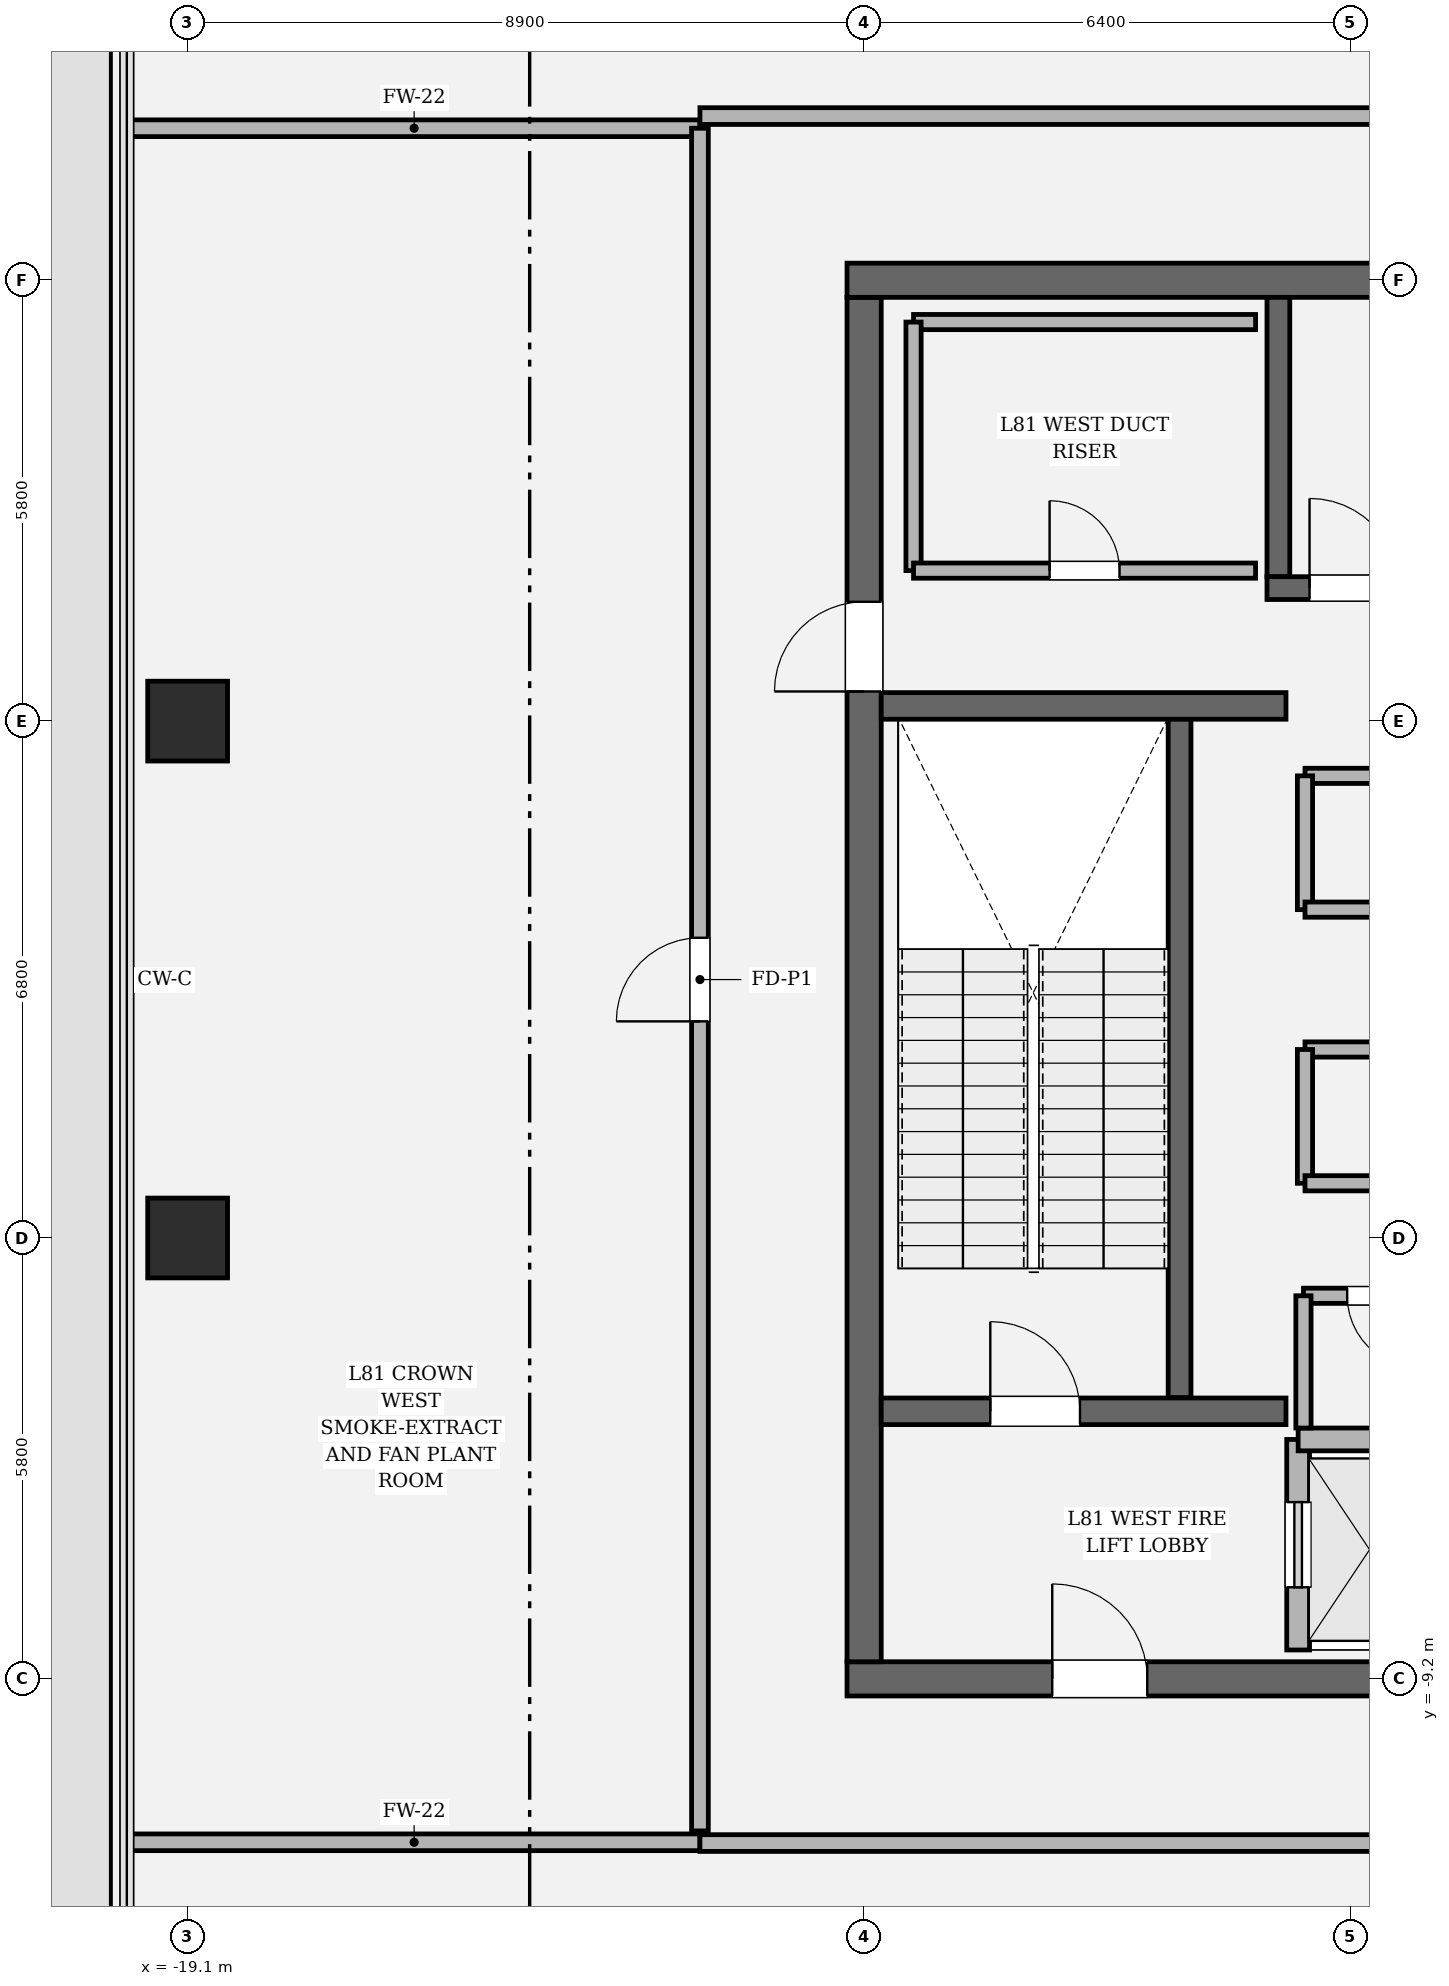
"""IFC4 building model, lengths in metres.
Left out: names, types, materials, properties, quantities, classifications, styles, units other than length and angle.
Written with IfcOpenShell. Run it as: python <this file> out.ifc"""

import sys

from ifc_helpers import new_model, si_unit, direction, frame, frame_2d, origin, origin_2d, place, context, subcontext, project, spatial, rectangle, hollow_rectangle, extrude, element, fill, save


model = new_model("IFC4")
c1 = context("Model", 3, precision=1e-05, world=origin(), true_north=direction((0.0, 1.0)))
c2 = subcontext(c1, "Body", "Model", "MODEL_VIEW")
j1 = project(units=[si_unit("LENGTHUNIT", "METRE"), si_unit("PLANEANGLEUNIT", "RADIAN")], contexts=[c1])
p1 = place(None, origin())
s1 = spatial("IfcSite", under=j1, at=p1, CompositionType="ELEMENT")
p2 = place(p1, origin())
s2 = spatial("IfcBuilding", under=s1, at=p2, CompositionType="ELEMENT")
p3 = place(p2, frame((0.0, 0.0, 343.8)))
s3 = spatial("IfcBuildingStorey", under=s2, at=p3, CompositionType="ELEMENT", Elevation=343.8)
p4 = place(p3, frame((10.425, -9.2, 0.0), z_axis=(0.0, 0.0, 1.0), x_axis=(-1.0, 0.0, 0.0)))
e1 = element("IfcWall", 1, at=p4, inside=s3, PredefinedType="SHEAR", context=c2, shape_type="SweptSolid", body=[
    extrude(rectangle(XDim=20.85, YDim=0.45, at=frame_2d((10.425, 0.0))), origin(), (0.0, 0.0, 1.0), 4.5),
])
p5 = place(p4, frame((2.7, 0.0, 0.0)))
e2 = element("IfcOpeningElement", 2, at=p5, cuts=e1, PredefinedType="OPENING", context=c2, shape_type="SweptSolid", body=[
    extrude(rectangle(XDim=1.25, YDim=2.25, at=frame_2d((0.625, 1.125))), frame((0.0, 0.235, 0.0), z_axis=(0.0, -1.0, 0.0), x_axis=(1.0, 0.0, 0.0)), (0.0, 0.0, 1.0), 0.47),
])
p6 = place(p4, frame((16.9, 0.0, 0.0)))
e3 = element("IfcOpeningElement", 3, at=p6, cuts=e1, PredefinedType="OPENING", context=c2, shape_type="SweptSolid", body=[
    extrude(rectangle(XDim=1.25, YDim=2.25, at=frame_2d((0.625, 1.125))), frame((0.0, 0.235, 0.0), z_axis=(0.0, -1.0, 0.0), x_axis=(1.0, 0.0, 0.0)), (0.0, 0.0, 1.0), 0.47),
])
p7 = place(p3, frame((-10.2, -8.975, 0.0), z_axis=(0.0, 0.0, 1.0), x_axis=(0.0, 1.0, 0.0)))
e4 = element("IfcWall", 4, at=p7, inside=s3, PredefinedType="SHEAR", context=c2, shape_type="SweptSolid", body=[
    extrude(rectangle(XDim=17.95, YDim=0.45, at=frame_2d((8.975, 0.0))), origin(), (0.0, 0.0, 1.0), 4.5),
])
p8 = place(p7, frame((12.765, 0.0, 0.0)))
e5 = element("IfcOpeningElement", 5, at=p8, cuts=e4, PredefinedType="OPENING", context=c2, shape_type="SweptSolid", body=[
    extrude(rectangle(XDim=1.18, YDim=2.2, at=frame_2d((0.59, 1.1))), frame((0.0, 0.235, 0.0), z_axis=(0.0, -1.0, 0.0), x_axis=(1.0, 0.0, 0.0)), (0.0, 0.0, 1.0), 0.47),
])
p9 = place(p3, frame((-10.425, 9.2, 0.0), z_axis=(0.0, 0.0, 1.0), x_axis=(1.0, 0.0, 0.0)))
e6 = element("IfcWall", 6, at=p9, inside=s3, PredefinedType="SHEAR", context=c2, shape_type="SweptSolid", body=[
    extrude(rectangle(XDim=20.85, YDim=0.45, at=frame_2d((10.425, 0.0))), origin(), (0.0, 0.0, 1.0), 4.5),
])
p10 = place(p3, frame((-6.05, -5.5, 0.0), z_axis=(0.0, 0.0, 1.0), x_axis=(0.0, 1.0, 0.0)))
e7 = element("IfcWall", 7, at=p10, inside=s3, PredefinedType="SOLIDWALL", context=c2, shape_type="SweptSolid", body=[
    extrude(rectangle(XDim=8.95, YDim=0.3, at=frame_2d((4.475, 0.0))), origin(), (0.0, 0.0, 1.0), 4.5),
])
p11 = place(p3, frame((-4.75, 5.3, 0.0), z_axis=(0.0, 0.0, 1.0), x_axis=(0.0, 1.0, 0.0)))
e8 = element("IfcWall", 8, at=p11, inside=s3, PredefinedType="SOLIDWALL", context=c2, shape_type="SweptSolid", body=[
    extrude(rectangle(XDim=3.675, YDim=0.3, at=frame_2d((1.837, 0.0))), origin(), (0.0, 0.0, 1.0), 4.5),
])
p12 = place(p3, frame((-4.9, 5.15, 0.0), z_axis=(0.0, 0.0, 1.0), x_axis=(1.0, 0.0, 0.0)))
e9 = element("IfcWall", 9, at=p12, inside=s3, PredefinedType="SOLIDWALL", context=c2, shape_type="SweptSolid", body=[
    extrude(rectangle(XDim=9.8, YDim=0.3, at=frame_2d((4.9, 0.0))), origin(), (0.0, 0.0, 1.0), 4.5),
])
p13 = place(p12, frame((0.56, 0.0, 0.0)))
e10 = element("IfcOpeningElement", 10, at=p13, cuts=e9, PredefinedType="OPENING", context=c2, shape_type="SweptSolid", body=[
    extrude(rectangle(XDim=1.18, YDim=2.2, at=frame_2d((0.59, 1.1))), frame((0.0, 0.16, 0.0), z_axis=(0.0, -1.0, 0.0), x_axis=(1.0, 0.0, 0.0)), (0.0, 0.0, 1.0), 0.32),
])
p14 = place(p3, frame((-9.975, -5.68, 0.0), z_axis=(0.0, 0.0, 1.0), x_axis=(1.0, 0.0, 0.0)))
e11 = element("IfcWall", 11, at=p14, inside=s3, PredefinedType="SOLIDWALL", context=c2, shape_type="SweptSolid", body=[
    extrude(rectangle(XDim=5.325, YDim=0.35, at=frame_2d((2.663, 0.0))), origin(), (0.0, 0.0, 1.0), 4.5),
])
p15 = place(p14, frame((1.435, 0.0, 0.0)))
e12 = element("IfcOpeningElement", 12, at=p15, cuts=e11, PredefinedType="OPENING", context=c2, shape_type="SweptSolid", body=[
    extrude(rectangle(XDim=1.18, YDim=2.2, at=frame_2d((0.59, 1.1))), frame((0.0, 0.185, 0.0), z_axis=(0.0, -1.0, 0.0), x_axis=(1.0, 0.0, 0.0)), (0.0, 0.0, 1.0), 0.37),
])
p16 = place(p3, frame((-9.975, 3.6, 0.0), z_axis=(0.0, 0.0, 1.0), x_axis=(1.0, 0.0, 0.0)))
e13 = element("IfcWall", 13, at=p16, inside=s3, PredefinedType="SOLIDWALL", context=c2, shape_type="SweptSolid", body=[
    extrude(rectangle(XDim=5.325, YDim=0.35, at=frame_2d((2.663, 0.0))), origin(), (0.0, 0.0, 1.0), 4.5),
])
for number, where, z_axis, x_axis in (
    (14, (-19.1, 3.4, 0.0), (0.0, 0.0, 1.0), (1.0, 0.0, 0.0)),
    (15, (-19.1, -3.4, 0.0), (0.0, 0.0, 1.0), (1.0, 0.0, 0.0)),
):
    element("IfcColumn", number, at=place(p3, frame(where, z_axis=z_axis, x_axis=x_axis)), inside=s3, PredefinedType="COLUMN", context=c2, shape_type="SweptSolid", body=[
        extrude(hollow_rectangle(XDim=1.05, YDim=1.05, WallThickness=0.03, at=origin_2d()), origin(), (0.0, 0.0, 1.0), 4.5),
    ])
p17 = place(p3, frame((-4.49, -8.82, 0.0), z_axis=(0.0, 0.0, 1.0), x_axis=(0.0, 1.0, 0.0)))
e16 = element("IfcWall", 16, at=p17, inside=s3, PredefinedType="SOLIDWALL", context=c2, shape_type="SweptSolid", body=[
    extrude(rectangle(XDim=2.77, YDim=0.3, at=frame_2d((1.385, 0.0))), origin(), (0.0, 0.0, 1.0), 4.28),
])
p18 = place(p17, frame((0.825, 0.0, 0.0)))
e17 = element("IfcOpeningElement", 17, at=p18, cuts=e16, PredefinedType="OPENING", context=c2, shape_type="SweptSolid", body=[
    extrude(rectangle(XDim=1.12, YDim=2.25, at=frame_2d((0.56, 1.125))), frame((0.0, 0.16, 0.0), z_axis=(0.0, -1.0, 0.0), x_axis=(1.0, 0.0, 0.0)), (0.0, 0.0, 1.0), 0.32),
])
p19 = place(p3, frame((-4.49, -6.05, 0.0), z_axis=(0.0, 0.0, 1.0), x_axis=(1.0, 0.0, 0.0)))
e18 = element("IfcWall", 18, at=p19, inside=s3, PredefinedType="SOLIDWALL", context=c2, shape_type="SweptSolid", body=[
    extrude(rectangle(XDim=1.88, YDim=0.3, at=frame_2d((0.94, 0.0))), origin(), (0.0, 0.0, 1.0), 4.28),
])
p20 = place(p3, frame((-2.32, -4.16, 0.0), z_axis=(0.0, 0.0, 1.0), x_axis=(-1.0, 0.0, 0.0)))
e19 = element("IfcWall", 19, at=p20, inside=s3, PredefinedType="SOLIDWALL", context=c2, shape_type="SweptSolid", body=[
    extrude(rectangle(XDim=2.1, YDim=0.2, at=frame_2d((1.05, 0.0))), origin(), (0.0, 0.0, 1.0), 4.28),
])
p21 = place(p20, frame((0.575, 0.0, 0.0)))
e20 = element("IfcOpeningElement", 20, at=p21, cuts=e19, PredefinedType="OPENING", context=c2, shape_type="SweptSolid", body=[
    extrude(rectangle(XDim=0.95, YDim=2.15, at=frame_2d((0.475, 1.075))), frame((0.0, 0.11, 0.0), z_axis=(0.0, -1.0, 0.0), x_axis=(1.0, 0.0, 0.0)), (0.0, 0.0, 1.0), 0.22),
])
p22 = place(p3, frame((-4.42, -4.16, 0.0), z_axis=(0.0, 0.0, 1.0), x_axis=(0.0, -1.0, 0.0)))
e21 = element("IfcWall", 21, at=p22, inside=s3, PredefinedType="SOLIDWALL", context=c2, shape_type="SweptSolid", body=[
    extrude(rectangle(XDim=1.74, YDim=0.2, at=frame_2d((0.87, 0.0))), origin(), (0.0, 0.0, 1.0), 4.28),
])
p23 = place(p3, frame((4.4, -0.92, 0.0), z_axis=(0.0, 0.0, 1.0), x_axis=(-1.0, 0.0, 0.0)))
e22 = element("IfcWall", 22, at=p23, inside=s3, PredefinedType="SOLIDWALL", context=c2, shape_type="SweptSolid", body=[
    extrude(rectangle(XDim=8.8, YDim=0.2, at=frame_2d((4.4, 0.0))), origin(), (0.0, 0.0, 1.0), 4.28),
])
p24 = place(p3, frame((-4.4, -0.92, 0.0), z_axis=(0.0, 0.0, 1.0), x_axis=(0.0, -1.0, 0.0)))
e23 = element("IfcWall", 23, at=p24, inside=s3, PredefinedType="SOLIDWALL", context=c2, shape_type="SweptSolid", body=[
    extrude(rectangle(XDim=1.76, YDim=0.2, at=frame_2d((0.88, 0.0))), origin(), (0.0, 0.0, 1.0), 4.28),
])
for number, where, z_axis, x_axis in (
    (24, (-4.4, -2.68, 0.0), (0.0, 0.0, 1.0), (1.0, 0.0, 0.0)),
    (25, (4.4, 2.68, 0.0), (0.0, 0.0, 1.0), (-1.0, 0.0, 0.0)),
):
    element("IfcWall", number, at=place(p3, frame(where, z_axis=z_axis, x_axis=x_axis)), inside=s3, PredefinedType="SOLIDWALL", context=c2, shape_type="SweptSolid", body=[
        extrude(rectangle(XDim=8.8, YDim=0.2, at=frame_2d((4.4, 0.0))), origin(), (0.0, 0.0, 1.0), 4.28),
    ])
p25 = place(p3, frame((-4.4, 2.68, 0.0), z_axis=(0.0, 0.0, 1.0), x_axis=(0.0, -1.0, 0.0)))
e26 = element("IfcWall", 26, at=p25, inside=s3, PredefinedType="SOLIDWALL", context=c2, shape_type="SweptSolid", body=[
    extrude(rectangle(XDim=1.76, YDim=0.2, at=frame_2d((0.88, 0.0))), origin(), (0.0, 0.0, 1.0), 4.28),
])
p26 = place(p3, frame((-4.4, 0.92, 0.0), z_axis=(0.0, 0.0, 1.0), x_axis=(1.0, 0.0, 0.0)))
e27 = element("IfcWall", 27, at=p26, inside=s3, PredefinedType="SOLIDWALL", context=c2, shape_type="SweptSolid", body=[
    extrude(rectangle(XDim=8.8, YDim=0.2, at=frame_2d((4.4, 0.0))), origin(), (0.0, 0.0, 1.0), 4.28),
])
p27 = place(p3, frame((-5.05, 8.65, 0.0), z_axis=(0.0, 0.0, 1.0), x_axis=(-1.0, 0.0, 0.0)))
e28 = element("IfcWall", 28, at=p27, inside=s3, PredefinedType="SOLIDWALL", context=c2, shape_type="SweptSolid", body=[
    extrude(rectangle(XDim=4.5, YDim=0.2, at=frame_2d((2.25, 0.0))), origin(), (0.0, 0.0, 1.0), 4.28),
])
p28 = place(p3, frame((-9.55, 8.65, 0.0), z_axis=(0.0, 0.0, 1.0), x_axis=(0.0, -1.0, 0.0)))
e29 = element("IfcWall", 29, at=p28, inside=s3, PredefinedType="SOLIDWALL", context=c2, shape_type="SweptSolid", body=[
    extrude(rectangle(XDim=3.27, YDim=0.2, at=frame_2d((1.635, 0.0))), origin(), (0.0, 0.0, 1.0), 4.28),
])
p29 = place(p3, frame((-9.55, 5.38, 0.0), z_axis=(0.0, 0.0, 1.0), x_axis=(1.0, 0.0, 0.0)))
e30 = element("IfcWall", 30, at=p29, inside=s3, PredefinedType="SOLIDWALL", context=c2, shape_type="SweptSolid", body=[
    extrude(rectangle(XDim=4.5, YDim=0.2, at=frame_2d((2.25, 0.0))), origin(), (0.0, 0.0, 1.0), 4.28),
])
p30 = place(p29, frame((1.79, 0.0, 0.0)))
e31 = element("IfcOpeningElement", 31, at=p30, cuts=e30, PredefinedType="OPENING", context=c2, shape_type="SweptSolid", body=[
    extrude(rectangle(XDim=0.92, YDim=2.1, at=frame_2d((0.46, 1.05))), frame((0.0, 0.11, 0.0), z_axis=(0.0, -1.0, 0.0), x_axis=(1.0, 0.0, 0.0)), (0.0, 0.0, 1.0), 0.22),
])
p31 = place(p3, frame((-19.88, -11.35, 0.0), z_axis=(0.0, 0.0, 1.0), x_axis=(1.0, 0.0, 0.0)))
e32 = element("IfcWall", 32, at=p31, inside=s3, PredefinedType="SOLIDWALL", context=c2, shape_type="SweptSolid", body=[
    extrude(rectangle(XDim=7.52, YDim=0.22, at=frame_2d((3.76, 0.0))), origin(), (0.0, 0.0, 1.0), 2.954),
])
p32 = place(p3, frame((-12.36, -11.36, 0.0), z_axis=(0.0, 0.0, 1.0), x_axis=(1.0, 0.0, 0.0)))
e33 = element("IfcWall", 33, at=p32, inside=s3, PredefinedType="SOLIDWALL", context=c2, shape_type="SweptSolid", body=[
    extrude(rectangle(XDim=24.72, YDim=0.22, at=frame_2d((12.36, 0.0))), origin(), (0.0, 0.0, 1.0), 2.954),
])
p33 = place(p32, frame((11.81, 0.0, 0.0)))
e34 = element("IfcOpeningElement", 34, at=p33, cuts=e33, PredefinedType="OPENING", context=c2, shape_type="SweptSolid", body=[
    extrude(rectangle(XDim=1.1, YDim=2.2, at=frame_2d((0.55, 1.1))), frame((0.0, 0.12, 0.0), z_axis=(0.0, -1.0, 0.0), x_axis=(1.0, 0.0, 0.0)), (0.0, 0.0, 1.0), 0.24),
])
p34 = place(p3, frame((-19.88, 11.2, 0.0), z_axis=(0.0, 0.0, 1.0), x_axis=(1.0, 0.0, 0.0)))
e35 = element("IfcWall", 35, at=p34, inside=s3, PredefinedType="SOLIDWALL", context=c2, shape_type="SweptSolid", body=[
    extrude(rectangle(XDim=7.52, YDim=0.22, at=frame_2d((3.76, 0.0))), origin(), (0.0, 0.0, 1.0), 2.954),
])
p35 = place(p3, frame((-12.36, 11.2, 0.0), z_axis=(0.0, 0.0, 1.0), x_axis=(0.0, -1.0, 0.0)))
e36 = element("IfcWall", 36, at=p35, inside=s3, PredefinedType="SOLIDWALL", context=c2, shape_type="SweptSolid", body=[
    extrude(rectangle(XDim=22.4, YDim=0.22, at=frame_2d((11.2, 0.0))), origin(), (0.0, 0.0, 1.0), 2.954),
])
p36 = place(p35, frame((10.65, 0.0, 0.0)))
e37 = element("IfcOpeningElement", 37, at=p36, cuts=e36, PredefinedType="OPENING", context=c2, shape_type="SweptSolid", body=[
    extrude(rectangle(XDim=1.1, YDim=2.2, at=frame_2d((0.55, 1.1))), frame((0.0, 0.12, 0.0), z_axis=(0.0, -1.0, 0.0), x_axis=(1.0, 0.0, 0.0)), (0.0, 0.0, 1.0), 0.24),
])
p37 = place(p3, frame((12.36, 11.36, 0.0), z_axis=(0.0, 0.0, 1.0), x_axis=(-1.0, 0.0, 0.0)))
e38 = element("IfcWall", 38, at=p37, inside=s3, PredefinedType="SOLIDWALL", context=c2, shape_type="SweptSolid", body=[
    extrude(rectangle(XDim=24.72, YDim=0.22, at=frame_2d((12.36, 0.0))), origin(), (0.0, 0.0, 1.0), 2.954),
])
p38 = place(p37, frame((11.81, 0.0, 0.0)))
e39 = element("IfcOpeningElement", 39, at=p38, cuts=e38, PredefinedType="OPENING", context=c2, shape_type="SweptSolid", body=[
    extrude(rectangle(XDim=1.1, YDim=2.2, at=frame_2d((0.55, 1.1))), frame((0.0, 0.12, 0.0), z_axis=(0.0, -1.0, 0.0), x_axis=(1.0, 0.0, 0.0)), (0.0, 0.0, 1.0), 0.24),
])
p39 = place(p15, origin())
e40 = element("IfcDoor", 40, at=p39, inside=s3, OperationType="SINGLE_SWING_LEFT", PredefinedType="DOOR", context=c2, shape_type="SweptSolid", body=[
    extrude(rectangle(XDim=1.18, YDim=2.2, at=frame_2d((0.59, 1.1))), frame((0.0, 0.025, 0.0), z_axis=(0.0, -1.0, 0.0), x_axis=(1.0, 0.0, 0.0)), (0.0, 0.0, 1.0), 0.05),
])
fill(e12, e40)
p40 = place(p13, origin())
e41 = element("IfcDoor", 41, at=p40, inside=s3, OperationType="SINGLE_SWING_LEFT", PredefinedType="DOOR", context=c2, shape_type="SweptSolid", body=[
    extrude(rectangle(XDim=1.18, YDim=2.2, at=frame_2d((0.59, 1.1))), frame((0.0, 0.025, 0.0), z_axis=(0.0, -1.0, 0.0), x_axis=(1.0, 0.0, 0.0)), (0.0, 0.0, 1.0), 0.05),
])
fill(e10, e41)
p41 = place(p6, origin())
e42 = element("IfcDoor", 42, at=p41, inside=s3, OperationType="SINGLE_SWING_RIGHT", PredefinedType="DOOR", context=c2, shape_type="SweptSolid", body=[
    extrude(rectangle(XDim=1.25, YDim=2.25, at=frame_2d((0.625, 1.125))), frame((0.0, 0.025, 0.0), z_axis=(0.0, -1.0, 0.0), x_axis=(1.0, 0.0, 0.0)), (0.0, 0.0, 1.0), 0.05),
])
fill(e3, e42)
p42 = place(p8, origin())
e43 = element("IfcDoor", 43, at=p42, inside=s3, OperationType="SINGLE_SWING_LEFT", PredefinedType="DOOR", context=c2, shape_type="SweptSolid", body=[
    extrude(rectangle(XDim=1.18, YDim=2.2, at=frame_2d((0.59, 1.1))), frame((0.0, 0.025, 0.0), z_axis=(0.0, -1.0, 0.0), x_axis=(1.0, 0.0, 0.0)), (0.0, 0.0, 1.0), 0.05),
])
fill(e5, e43)
p43 = place(p18, origin())
e44 = element("IfcDoor", 44, at=p43, inside=s3, OperationType="SLIDING_TO_LEFT", PredefinedType="DOOR", context=c2, shape_type="SweptSolid", body=[
    extrude(rectangle(XDim=1.12, YDim=2.25, at=frame_2d((0.56, 1.125))), frame((0.0, 0.025, 0.0), z_axis=(0.0, -1.0, 0.0), x_axis=(1.0, 0.0, 0.0)), (0.0, 0.0, 1.0), 0.05),
])
fill(e17, e44)
p44 = place(p21, origin())
e45 = element("IfcDoor", 45, at=p44, inside=s3, OperationType="SINGLE_SWING_LEFT", PredefinedType="DOOR", context=c2, shape_type="SweptSolid", body=[
    extrude(rectangle(XDim=0.95, YDim=2.15, at=frame_2d((0.475, 1.075))), frame((0.0, 0.025, 0.0), z_axis=(0.0, -1.0, 0.0), x_axis=(1.0, 0.0, 0.0)), (0.0, 0.0, 1.0), 0.05),
])
fill(e20, e45)
p45 = place(p30, origin())
e46 = element("IfcDoor", 46, at=p45, inside=s3, OperationType="SINGLE_SWING_LEFT", PredefinedType="DOOR", context=c2, shape_type="SweptSolid", body=[
    extrude(rectangle(XDim=0.92, YDim=2.1, at=frame_2d((0.46, 1.05))), frame((0.0, 0.025, 0.0), z_axis=(0.0, -1.0, 0.0), x_axis=(1.0, 0.0, 0.0)), (0.0, 0.0, 1.0), 0.05),
])
fill(e31, e46)
p46 = place(p36, origin())
e47 = element("IfcDoor", 47, at=p46, inside=s3, OperationType="SINGLE_SWING_RIGHT", PredefinedType="DOOR", context=c2, shape_type="SweptSolid", body=[
    extrude(rectangle(XDim=1.1, YDim=2.2, at=frame_2d((0.55, 1.1))), frame((0.0, 0.025, 0.0), z_axis=(0.0, -1.0, 0.0), x_axis=(1.0, 0.0, 0.0)), (0.0, 0.0, 1.0), 0.05),
])
fill(e37, e47)
save(model, sys.argv[1])
